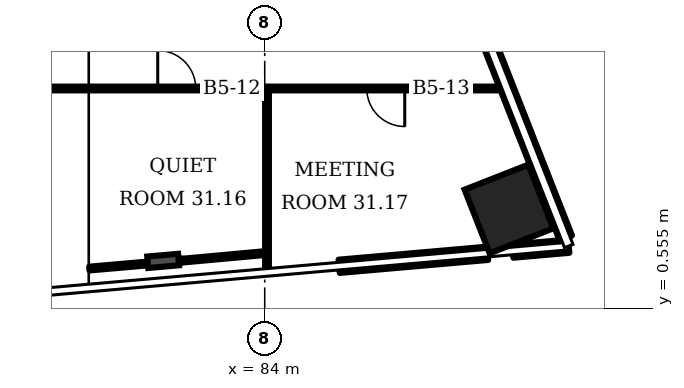
"""IFC4 building model, lengths in metres.
Left out: names, types, materials, properties, quantities, classifications, styles, units other than length and angle.
Written with IfcOpenShell. Run it as: python <this file> out.ifc"""

import sys

from ifc_helpers import new_model, si_unit, direction, frame, frame_2d, origin, origin_2d, place, context, subcontext, project, spatial, rectangle, i_section, extrude, element, fill, save


model = new_model("IFC4")
c1 = context("Model", 3, precision=1e-05, world=origin(), true_north=direction((0.0, 1.0)))
c2 = subcontext(c1, "Body", "Model", "MODEL_VIEW")
j1 = project(units=[si_unit("LENGTHUNIT", "METRE"), si_unit("PLANEANGLEUNIT", "RADIAN")], contexts=[c1])
p1 = place(None, origin())
s1 = spatial("IfcSite", under=j1, at=p1, CompositionType="ELEMENT")
p2 = place(p1, origin())
s2 = spatial("IfcBuilding", under=s1, at=p2, CompositionType="ELEMENT")
p3 = place(p2, frame((0.0, 0.0, 132.7)))
s3 = spatial("IfcBuildingStorey", under=s2, at=p3, CompositionType="ELEMENT", Elevation=132.7)
p4 = place(p3, frame((90.427, 3.174, 0.0), z_axis=(0.0, 0.0, 1.0), x_axis=(-0.365778, 0.930702, 0.0)))
e1 = element("IfcColumn", 1, at=p4, inside=s3, PredefinedType="COLUMN", context=c2, shape_type="SweptSolid", body=[
    extrude(rectangle(XDim=1.8, YDim=1.8, at=origin_2d()), origin(), (0.0, 0.0, 1.0), 3.6),
])
p5 = place(p3, frame((81.328, 1.808, 0.0), z_axis=(0.0, 0.0, 1.0), x_axis=(0.087156, -0.996198, 0.0)))
e2 = element("IfcColumn", 2, at=p5, inside=s3, PredefinedType="COLUMN", context=c2, shape_type="SweptSolid", body=[
    extrude(i_section(OverallWidth=0.303, OverallDepth=0.814, WebThickness=0.021, FlangeThickness=0.04, FilletRadius=0.03, at=origin_2d()), origin(), (0.0, 0.0, 1.0), 3.6),
])
p6 = place(p3, frame((85.959, 1.667, 0.0), z_axis=(0.0, 0.0, 1.0), x_axis=(0.996194, 0.087167, 0.0)))
e3 = element("IfcWall", 3, at=p6, inside=s3, PredefinedType="SOLIDWALL", context=c2, shape_type="SweptSolid", body=[
    extrude(rectangle(XDim=3.921, YDim=0.35, at=frame_2d((1.96, 0.0))), origin(), (0.0, 0.0, 1.0), 1.0),
])
p7 = place(p3, frame((90.527, 2.066, 0.0), z_axis=(0.0, 0.0, 1.0), x_axis=(0.996198, 0.087157, 0.0)))
e4 = element("IfcWall", 4, at=p7, inside=s3, PredefinedType="SOLIDWALL", context=c2, shape_type="SweptSolid", body=[
    extrude(rectangle(XDim=1.479, YDim=0.35, at=frame_2d((0.74, 0.0))), origin(), (0.0, 0.0, 1.0), 1.0),
])
p8 = place(p3, frame((91.921, 2.414, 0.0), z_axis=(0.0, 0.0, 1.0), x_axis=(-0.36578, 0.930701, 0.0)))
e5 = element("IfcWall", 5, at=p8, inside=s3, PredefinedType="SOLIDWALL", context=c2, shape_type="SweptSolid", body=[
    extrude(rectangle(XDim=5.852, YDim=0.35, at=frame_2d((2.926, 0.0))), origin(), (0.0, 0.0, 1.0), 1.0),
])
p9 = place(p3, frame((76.891, 6.345, 0.0), z_axis=(0.0, 0.0, 1.0), x_axis=(1.0, 0.0, 0.0)))
e6 = element("IfcWall", 6, at=p9, inside=s3, PredefinedType="PARTITIONING", context=c2, shape_type="SweptSolid", body=[
    extrude(rectangle(XDim=13.458, YDim=0.1, at=frame_2d((6.729, 0.0))), origin(), (0.0, 0.0, 1.0), 2.58),
])
p10 = place(p9, frame((4.294, 0.0, 0.0)))
e7 = element("IfcOpeningElement", 7, at=p10, cuts=e6, PredefinedType="OPENING", context=c2, shape_type="SweptSolid", body=[
    extrude(rectangle(XDim=1.0, YDim=2.1, at=frame_2d((0.5, 1.05))), frame((0.0, 0.06, 0.0), z_axis=(0.0, -1.0, 0.0), x_axis=(1.0, 0.0, 0.0)), (0.0, 0.0, 1.0), 0.12),
])
p11 = place(p9, frame((9.794, 0.0, 0.0)))
e8 = element("IfcOpeningElement", 8, at=p11, cuts=e6, PredefinedType="OPENING", context=c2, shape_type="SweptSolid", body=[
    extrude(rectangle(XDim=1.0, YDim=2.1, at=frame_2d((0.5, 1.05))), frame((0.0, 0.06, 0.0), z_axis=(0.0, -1.0, 0.0), x_axis=(1.0, 0.0, 0.0)), (0.0, 0.0, 1.0), 0.12),
])
p12 = place(p3, frame((79.386, 1.607, 0.0), z_axis=(0.0, 0.0, 1.0), x_axis=(0.996209, 0.086973, 0.0)))
e9 = element("IfcWall", 9, at=p12, inside=s3, PredefinedType="PARTITIONING", context=c2, shape_type="SweptSolid", body=[
    extrude(rectangle(XDim=2.453, YDim=0.1, at=frame_2d((1.227, 0.0))), origin(), (0.0, 0.0, 1.0), 2.58),
])
p13 = place(p3, frame((81.83, 1.815, 0.0), z_axis=(0.0, 0.0, 1.0), x_axis=(0.995841, 0.091138, 0.0)))
e10 = element("IfcWall", 10, at=p13, inside=s3, PredefinedType="PARTITIONING", context=c2, shape_type="SweptSolid", body=[
    extrude(rectangle(XDim=2.194, YDim=0.1, at=frame_2d((1.097, 0.0))), origin(), (0.0, 0.0, 1.0), 2.58),
])
p14 = place(p3, frame((84.06, 1.525, 0.0), z_axis=(0.0, 0.0, 1.0), x_axis=(0.0, 1.0, 0.0)))
e11 = element("IfcWall", 11, at=p14, inside=s3, PredefinedType="PARTITIONING", context=c2, shape_type="SweptSolid", body=[
    extrude(rectangle(XDim=4.82, YDim=0.1, at=frame_2d((2.41, 0.0))), origin(), (0.0, 0.0, 1.0), 2.58),
])
p15 = place(p10, origin())
e12 = element("IfcDoor", 12, at=p15, inside=s3, OperationType="SINGLE_SWING_LEFT", PredefinedType="DOOR", context=c2, shape_type="SweptSolid", body=[
    extrude(rectangle(XDim=1.0, YDim=2.1, at=frame_2d((0.5, 1.05))), frame((0.0, 0.025, 0.0), z_axis=(0.0, -1.0, 0.0), x_axis=(1.0, 0.0, 0.0)), (0.0, 0.0, 1.0), 0.05),
])
fill(e7, e12)
p16 = place(p11, origin())
e13 = element("IfcDoor", 13, at=p16, inside=s3, OperationType="SINGLE_SWING_RIGHT", PredefinedType="DOOR", context=c2, shape_type="SweptSolid", body=[
    extrude(rectangle(XDim=1.0, YDim=2.1, at=frame_2d((0.5, 1.05))), frame((0.0, 0.025, 0.0), z_axis=(0.0, -1.0, 0.0), x_axis=(1.0, 0.0, 0.0)), (0.0, 0.0, 1.0), 0.05),
])
fill(e8, e13)
save(model, sys.argv[1])
